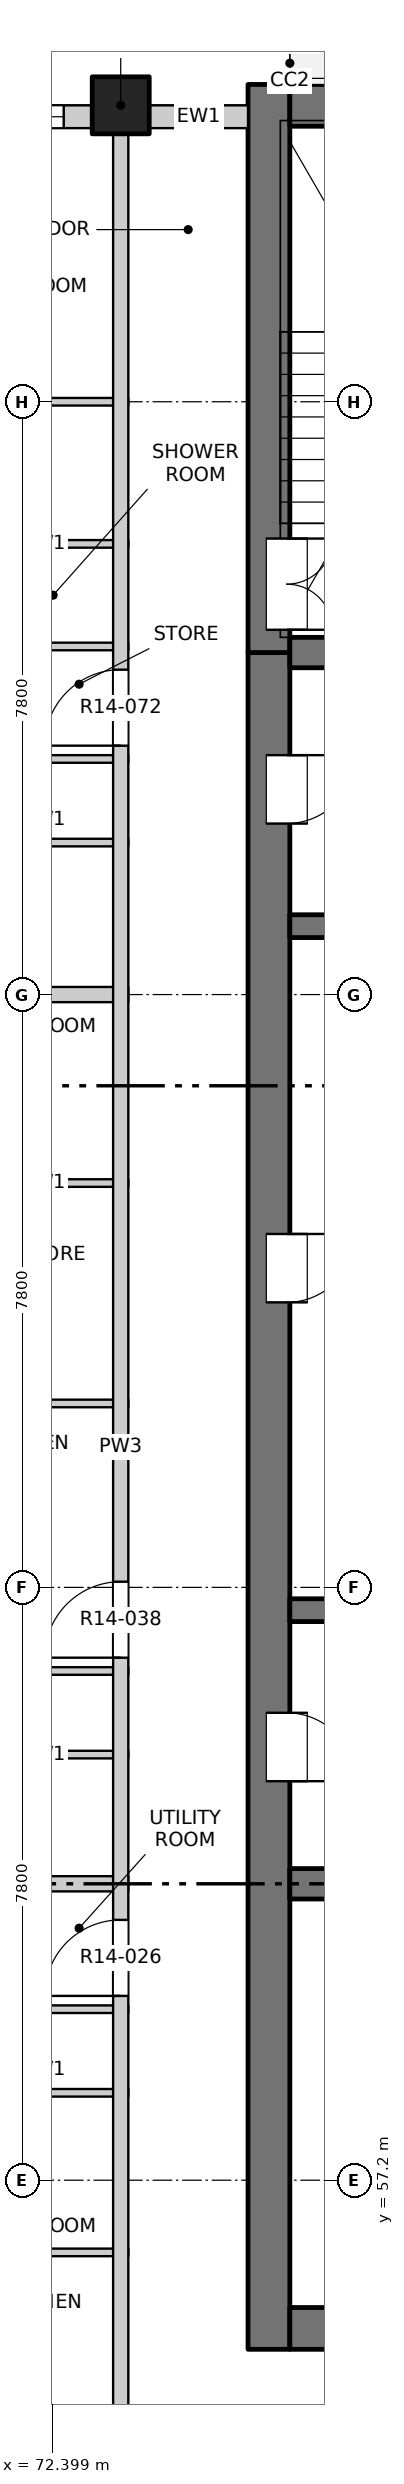
"""IFC4 building model, lengths in metres.
Left out: names, types, materials, properties, quantities, classifications, styles, units other than length and angle.
Written with IfcOpenShell. Run it as: python <this file> out.ifc"""

import sys

from ifc_helpers import new_model, si_unit, direction, frame, frame_2d, origin, origin_2d, place, context, subcontext, project, spatial, rectangle, extrude, element, fill, save


model = new_model("IFC4")
c1 = context("Model", 3, precision=1e-05, world=origin(), true_north=direction((0.0, 1.0)))
c2 = subcontext(c1, "Body", "Model", "MODEL_VIEW")
j1 = project(units=[si_unit("LENGTHUNIT", "METRE"), si_unit("PLANEANGLEUNIT", "RADIAN")], contexts=[c1])
p1 = place(None, origin())
s1 = spatial("IfcSite", under=j1, at=p1, CompositionType="ELEMENT")
p2 = place(p1, origin())
s2 = spatial("IfcBuilding", under=s1, at=p2, CompositionType="ELEMENT")
p3 = place(p2, frame((0.0, 0.0, 148.6)))
s3 = spatial("IfcBuildingStorey", under=s2, at=p3, CompositionType="ELEMENT", Elevation=148.6)
p4 = place(p3, frame((73.3, 84.5, -0.3), z_axis=(0.0, 0.0, 1.0), x_axis=(1.0, 0.0, 0.0)))
e1 = element("IfcColumn", 1, at=p4, inside=s3, PredefinedType="COLUMN", context=c2, shape_type="SweptSolid", body=[
    extrude(rectangle(XDim=0.75, YDim=0.75, at=origin_2d()), origin(), (0.0, 0.0, 1.0), 3.45),
])
p5 = place(p3, frame((75.25, 54.975, -0.3), z_axis=(0.0, 0.0, 1.0), x_axis=(0.0, 1.0, 0.0)))
e2 = element("IfcWall", 2, at=p5, inside=s3, PredefinedType="SOLIDWALL", context=c2, shape_type="SweptSolid", body=[
    extrude(rectangle(XDim=22.325, YDim=0.55, at=frame_2d((11.163, 0.0))), origin(), (0.0, 0.0, 1.0), 3.45),
])
p6 = place(p5, frame((7.475, 0.0, 0.3)))
e3 = element("IfcOpeningElement", 3, at=p6, cuts=e2, PredefinedType="OPENING", context=c2, shape_type="SweptSolid", body=[
    extrude(rectangle(XDim=0.9, YDim=2.1, at=frame_2d((0.45, 1.05))), frame((0.0, 0.285, 0.0), z_axis=(0.0, -1.0, 0.0), x_axis=(1.0, 0.0, 0.0)), (0.0, 0.0, 1.0), 0.57),
])
p7 = place(p5, frame((13.775, 0.0, 0.3)))
e4 = element("IfcOpeningElement", 4, at=p7, cuts=e2, PredefinedType="OPENING", context=c2, shape_type="SweptSolid", body=[
    extrude(rectangle(XDim=0.9, YDim=2.1, at=frame_2d((0.45, 1.05))), frame((0.0, 0.285, 0.0), z_axis=(0.0, -1.0, 0.0), x_axis=(1.0, 0.0, 0.0)), (0.0, 0.0, 1.0), 0.57),
])
p8 = place(p5, frame((20.075, 0.0, 0.3)))
e5 = element("IfcOpeningElement", 5, at=p8, cuts=e2, PredefinedType="OPENING", context=c2, shape_type="SweptSolid", body=[
    extrude(rectangle(XDim=0.9, YDim=2.1, at=frame_2d((0.45, 1.05))), frame((0.0, 0.285, 0.0), z_axis=(0.0, -1.0, 0.0), x_axis=(1.0, 0.0, 0.0)), (0.0, 0.0, 1.0), 0.57),
])
p9 = place(p3, frame((75.25, 77.3, -0.3), z_axis=(0.0, 0.0, 1.0), x_axis=(0.0, 1.0, 0.0)))
e6 = element("IfcWall", 6, at=p9, inside=s3, PredefinedType="SOLIDWALL", context=c2, shape_type="SweptSolid", body=[
    extrude(rectangle(XDim=7.475, YDim=0.55, at=frame_2d((3.737, 0.0))), origin(), (0.0, 0.0, 1.0), 3.45),
])
p10 = place(p9, frame((0.3, 0.0, 0.3)))
e7 = element("IfcOpeningElement", 7, at=p10, cuts=e6, PredefinedType="OPENING", context=c2, shape_type="SweptSolid", body=[
    extrude(rectangle(XDim=1.2, YDim=2.1, at=frame_2d((0.6, 1.05))), frame((0.0, 0.285, 0.0), z_axis=(0.0, -1.0, 0.0), x_axis=(1.0, 0.0, 0.0)), (0.0, 0.0, 1.0), 0.57),
])
p11 = place(p3, frame((75.525, 55.25, -0.3), z_axis=(0.0, 0.0, 1.0), x_axis=(1.0, 0.0, 0.0)))
e8 = element("IfcWall", 8, at=p11, inside=s3, PredefinedType="SOLIDWALL", context=c2, shape_type="SweptSolid", body=[
    extrude(rectangle(XDim=18.95, YDim=0.55, at=frame_2d((9.475, 0.0))), origin(), (0.0, 0.0, 1.0), 3.45),
])
p12 = place(p11, frame((8.725, 0.0, 0.3)))
e9 = element("IfcOpeningElement", 9, at=p12, cuts=e8, PredefinedType="OPENING", context=c2, shape_type="SweptSolid", body=[
    extrude(rectangle(XDim=1.5, YDim=2.1, at=frame_2d((0.75, 1.05))), frame((0.0, 0.285, 0.0), z_axis=(0.0, -1.0, 0.0), x_axis=(1.0, 0.0, 0.0)), (0.0, 0.0, 1.0), 0.57),
])
p13 = place(p3, frame((75.525, 84.5, -0.3), z_axis=(0.0, 0.0, 1.0), x_axis=(1.0, 0.0, 0.0)))
e10 = element("IfcWall", 10, at=p13, inside=s3, PredefinedType="SOLIDWALL", context=c2, shape_type="SweptSolid", body=[
    extrude(rectangle(XDim=18.95, YDim=0.55, at=frame_2d((9.475, 0.0))), origin(), (0.0, 0.0, 1.0), 3.45),
])
p14 = place(p3, frame((75.525, 61.1, -0.3), z_axis=(0.0, 0.0, 1.0), x_axis=(1.0, 0.0, 0.0)))
e11 = element("IfcWall", 11, at=p14, inside=s3, PredefinedType="SOLIDWALL", context=c2, shape_type="SweptSolid", body=[
    extrude(rectangle(XDim=3.775, YDim=0.4, at=frame_2d((1.888, 0.0))), origin(), (0.0, 0.0, 1.0), 3.45),
])
for number, where, z_axis, x_axis in (
    (12, (75.525, 64.7, -0.3), (0.0, 0.0, 1.0), (1.0, 0.0, 0.0)),
    (13, (75.525, 73.7, -0.3), (0.0, 0.0, 1.0), (1.0, 0.0, 0.0)),
):
    element("IfcWall", number, at=place(p3, frame(where, z_axis=z_axis, x_axis=x_axis)), inside=s3, PredefinedType="SOLIDWALL", context=c2, shape_type="SweptSolid", body=[
        extrude(rectangle(XDim=3.775, YDim=0.3, at=frame_2d((1.888, 0.0))), origin(), (0.0, 0.0, 1.0), 3.45),
    ])
p15 = place(p3, frame((75.525, 77.3, -0.3), z_axis=(0.0, 0.0, 1.0), x_axis=(1.0, 0.0, 0.0)))
e14 = element("IfcWall", 14, at=p15, inside=s3, PredefinedType="SOLIDWALL", context=c2, shape_type="SweptSolid", body=[
    extrude(rectangle(XDim=3.775, YDim=0.4, at=frame_2d((1.888, 0.0))), origin(), (0.0, 0.0, 1.0), 3.45),
])
p16 = place(p3, frame((69.4, 84.35, 0.0), z_axis=(0.0, 0.0, 1.0), x_axis=(1.0, 0.0, 0.0)))
e15 = element("IfcWall", 15, at=p16, inside=s3, PredefinedType="SOLIDWALL", context=c2, shape_type="SweptSolid", body=[
    extrude(rectangle(XDim=3.525, YDim=0.3, at=frame_2d((1.763, 0.0))), origin(), (0.0, 0.0, 1.0), 2.7),
])
p17 = place(p16, frame((0.75, 0.0, 0.9)))
e16 = element("IfcOpeningElement", 16, at=p17, cuts=e15, PredefinedType="OPENING", context=c2, shape_type="SweptSolid", body=[
    extrude(rectangle(XDim=2.4, YDim=1.8, at=frame_2d((1.2, 0.9))), frame((0.0, 0.16, 0.0), z_axis=(0.0, -1.0, 0.0), x_axis=(1.0, 0.0, 0.0)), (0.0, 0.0, 1.0), 0.32),
])
p18 = place(p3, frame((73.675, 84.35, 0.0), z_axis=(0.0, 0.0, 1.0), x_axis=(1.0, 0.0, 0.0)))
e17 = element("IfcWall", 17, at=p18, inside=s3, PredefinedType="SOLIDWALL", context=c2, shape_type="SweptSolid", body=[
    extrude(rectangle(XDim=1.3, YDim=0.3, at=frame_2d((0.65, 0.0))), origin(), (0.0, 0.0, 1.0), 2.7),
])
for number, where, z_axis, x_axis in (
    (18, (71.18, 56.25, 0.0), (0.0, 0.0, 1.0), (1.0, 0.0, 0.0)),
    (19, (71.18, 58.35, 0.0), (0.0, 0.0, 1.0), (1.0, 0.0, 0.0)),
    (20, (71.18, 59.45, 0.0), (0.0, 0.0, 1.0), (1.0, 0.0, 0.0)),
):
    element("IfcWall", number, at=place(p3, frame(where, z_axis=z_axis, x_axis=x_axis)), inside=s3, PredefinedType="PARTITIONING", context=c2, shape_type="SweptSolid", body=[
        extrude(rectangle(XDim=2.22, YDim=0.1, at=frame_2d((1.11, 0.0))), origin(), (0.0, 0.0, 1.0), 3.15),
    ])
p19 = place(p3, frame((65.8, 61.1, 0.0), z_axis=(0.0, 0.0, 1.0), x_axis=(1.0, 0.0, 0.0)))
e21 = element("IfcWall", 21, at=p19, inside=s3, PredefinedType="PARTITIONING", context=c2, shape_type="SweptSolid", body=[
    extrude(rectangle(XDim=7.6, YDim=0.2, at=frame_2d((3.8, 0.0))), origin(), (0.0, 0.0, 1.0), 2.55),
])
for number, where, z_axis, x_axis in (
    (22, (71.18, 62.8, 0.0), (0.0, 0.0, 1.0), (1.0, 0.0, 0.0)),
    (23, (71.18, 63.9, 0.0), (0.0, 0.0, 1.0), (1.0, 0.0, 0.0)),
    (24, (71.18, 67.42, 0.0), (0.0, 0.0, 1.0), (1.0, 0.0, 0.0)),
    (25, (71.18, 70.32, 0.0), (0.0, 0.0, 1.0), (1.0, 0.0, 0.0)),
):
    element("IfcWall", number, at=place(p3, frame(where, z_axis=z_axis, x_axis=x_axis)), inside=s3, PredefinedType="PARTITIONING", context=c2, shape_type="SweptSolid", body=[
        extrude(rectangle(XDim=2.22, YDim=0.1, at=frame_2d((1.11, 0.0))), origin(), (0.0, 0.0, 1.0), 3.15),
    ])
p20 = place(p3, frame((65.8, 72.8, 0.0), z_axis=(0.0, 0.0, 1.0), x_axis=(1.0, 0.0, 0.0)))
e26 = element("IfcWall", 26, at=p20, inside=s3, PredefinedType="PARTITIONING", context=c2, shape_type="SweptSolid", body=[
    extrude(rectangle(XDim=7.6, YDim=0.2, at=frame_2d((3.8, 0.0))), origin(), (0.0, 0.0, 1.0), 3.15),
])
for number, where, z_axis, x_axis in (
    (27, (71.18, 74.8, 0.0), (0.0, 0.0, 1.0), (1.0, 0.0, 0.0)),
    (28, (71.18, 75.9, 0.0), (0.0, 0.0, 1.0), (1.0, 0.0, 0.0)),
    (29, (71.18, 77.38, 0.0), (0.0, 0.0, 1.0), (1.0, 0.0, 0.0)),
    (30, (71.18, 78.73, 0.0), (0.0, 0.0, 1.0), (1.0, 0.0, 0.0)),
):
    element("IfcWall", number, at=place(p3, frame(where, z_axis=z_axis, x_axis=x_axis)), inside=s3, PredefinedType="PARTITIONING", context=c2, shape_type="SweptSolid", body=[
        extrude(rectangle(XDim=2.22, YDim=0.1, at=frame_2d((1.11, 0.0))), origin(), (0.0, 0.0, 1.0), 3.15),
    ])
p21 = place(p3, frame((65.8, 80.6, 0.0), z_axis=(0.0, 0.0, 1.0), x_axis=(1.0, 0.0, 0.0)))
e31 = element("IfcWall", 31, at=p21, inside=s3, PredefinedType="PARTITIONING", context=c2, shape_type="SweptSolid", body=[
    extrude(rectangle(XDim=7.6, YDim=0.1, at=frame_2d((3.8, 0.0))), origin(), (0.0, 0.0, 1.0), 3.15),
])
p22 = place(p21, frame((4.14, 0.0, 0.0)))
e32 = element("IfcOpeningElement", 32, at=p22, cuts=e31, PredefinedType="OPENING", context=c2, shape_type="SweptSolid", body=[
    extrude(rectangle(XDim=0.9, YDim=2.1, at=frame_2d((0.45, 1.05))), frame((0.0, 0.06, 0.0), z_axis=(0.0, -1.0, 0.0), x_axis=(1.0, 0.0, 0.0)), (0.0, 0.0, 1.0), 0.12),
])
p23 = place(p3, frame((73.3, 49.5, 0.0), z_axis=(0.0, 0.0, 1.0), x_axis=(0.0, 1.0, 0.0)))
e33 = element("IfcWall", 33, at=p23, inside=s3, PredefinedType="PARTITIONING", context=c2, shape_type="SweptSolid", body=[
    extrude(rectangle(XDim=34.7, YDim=0.2, at=frame_2d((17.35, 0.0))), origin(), (0.0, 0.0, 1.0), 3.15),
])
p24 = place(p23, frame((10.125, 0.0, 0.0)))
e34 = element("IfcOpeningElement", 34, at=p24, cuts=e33, PredefinedType="OPENING", context=c2, shape_type="SweptSolid", body=[
    extrude(rectangle(XDim=1.0, YDim=2.1, at=frame_2d((0.5, 1.05))), frame((0.0, 0.11, 0.0), z_axis=(0.0, -1.0, 0.0), x_axis=(1.0, 0.0, 0.0)), (0.0, 0.0, 1.0), 0.22),
])
p25 = place(p23, frame((14.575, 0.0, 0.0)))
e35 = element("IfcOpeningElement", 35, at=p25, cuts=e33, PredefinedType="OPENING", context=c2, shape_type="SweptSolid", body=[
    extrude(rectangle(XDim=1.0, YDim=2.1, at=frame_2d((0.5, 1.05))), frame((0.0, 0.11, 0.0), z_axis=(0.0, -1.0, 0.0), x_axis=(1.0, 0.0, 0.0)), (0.0, 0.0, 1.0), 0.22),
])
p26 = place(p23, frame((26.575, 0.0, 0.0)))
e36 = element("IfcOpeningElement", 36, at=p26, cuts=e33, PredefinedType="OPENING", context=c2, shape_type="SweptSolid", body=[
    extrude(rectangle(XDim=1.0, YDim=2.1, at=frame_2d((0.5, 1.05))), frame((0.0, 0.11, 0.0), z_axis=(0.0, -1.0, 0.0), x_axis=(1.0, 0.0, 0.0)), (0.0, 0.0, 1.0), 0.22),
])
p27 = place(p17, origin())
e37 = element("IfcWindow", 37, at=p27, inside=s3, PartitioningType="DOUBLE_PANEL_VERTICAL", PredefinedType="WINDOW", context=c2, shape_type="SweptSolid", body=[
    extrude(rectangle(XDim=2.4, YDim=1.8, at=frame_2d((1.2, 0.9))), frame((0.0, 0.03, 0.0), z_axis=(0.0, -1.0, 0.0), x_axis=(1.0, 0.0, 0.0)), (0.0, 0.0, 1.0), 0.06),
])
fill(e16, e37)
p28 = place(p24, origin())
e38 = element("IfcDoor", 38, at=p28, inside=s3, OperationType="SINGLE_SWING_RIGHT", PredefinedType="DOOR", context=c2, shape_type="SweptSolid", body=[
    extrude(rectangle(XDim=1.0, YDim=2.1, at=frame_2d((0.5, 1.05))), frame((0.0, 0.025, 0.0), z_axis=(0.0, -1.0, 0.0), x_axis=(1.0, 0.0, 0.0)), (0.0, 0.0, 1.0), 0.05),
])
fill(e34, e38)
p29 = place(p6, origin())
e39 = element("IfcDoor", 39, at=p29, inside=s3, OperationType="SINGLE_SWING_RIGHT", PredefinedType="DOOR", context=c2, shape_type="SweptSolid", body=[
    extrude(rectangle(XDim=0.9, YDim=2.1, at=frame_2d((0.45, 1.05))), frame((0.0, -0.21, 0.0), z_axis=(0.0, -1.0, 0.0), x_axis=(1.0, 0.0, 0.0)), (0.0, 0.0, 1.0), 0.05),
])
fill(e3, e39)
p30 = place(p25, origin())
e40 = element("IfcDoor", 40, at=p30, inside=s3, OperationType="SINGLE_SWING_RIGHT", PredefinedType="DOOR", context=c2, shape_type="SweptSolid", body=[
    extrude(rectangle(XDim=1.0, YDim=2.1, at=frame_2d((0.5, 1.05))), frame((0.0, 0.025, 0.0), z_axis=(0.0, -1.0, 0.0), x_axis=(1.0, 0.0, 0.0)), (0.0, 0.0, 1.0), 0.05),
])
fill(e35, e40)
p31 = place(p7, origin())
e41 = element("IfcDoor", 41, at=p31, inside=s3, OperationType="SINGLE_SWING_LEFT", PredefinedType="DOOR", context=c2, shape_type="SweptSolid", body=[
    extrude(rectangle(XDim=0.9, YDim=2.1, at=frame_2d((0.45, 1.05))), frame((0.0, -0.21, 0.0), z_axis=(0.0, -1.0, 0.0), x_axis=(1.0, 0.0, 0.0)), (0.0, 0.0, 1.0), 0.05),
])
fill(e4, e41)
p32 = place(p8, origin())
e42 = element("IfcDoor", 42, at=p32, inside=s3, OperationType="SINGLE_SWING_LEFT", PredefinedType="DOOR", context=c2, shape_type="SweptSolid", body=[
    extrude(rectangle(XDim=0.9, YDim=2.1, at=frame_2d((0.45, 1.05))), frame((0.0, -0.21, 0.0), z_axis=(0.0, -1.0, 0.0), x_axis=(1.0, 0.0, 0.0)), (0.0, 0.0, 1.0), 0.05),
])
fill(e5, e42)
p33 = place(p26, origin())
e43 = element("IfcDoor", 43, at=p33, inside=s3, OperationType="SINGLE_SWING_RIGHT", PredefinedType="DOOR", context=c2, shape_type="SweptSolid", body=[
    extrude(rectangle(XDim=1.0, YDim=2.1, at=frame_2d((0.5, 1.05))), frame((0.0, 0.025, 0.0), z_axis=(0.0, -1.0, 0.0), x_axis=(1.0, 0.0, 0.0)), (0.0, 0.0, 1.0), 0.05),
])
fill(e36, e43)
p34 = place(p10, origin())
e44 = element("IfcDoor", 44, at=p34, inside=s3, OperationType="DOUBLE_DOOR_SINGLE_SWING", PredefinedType="DOOR", context=c2, shape_type="SweptSolid", body=[
    extrude(rectangle(XDim=1.2, YDim=2.1, at=frame_2d((0.6, 1.05))), frame((0.0, -0.21, 0.0), z_axis=(0.0, -1.0, 0.0), x_axis=(1.0, 0.0, 0.0)), (0.0, 0.0, 1.0), 0.05),
])
fill(e7, e44)
save(model, sys.argv[1])
